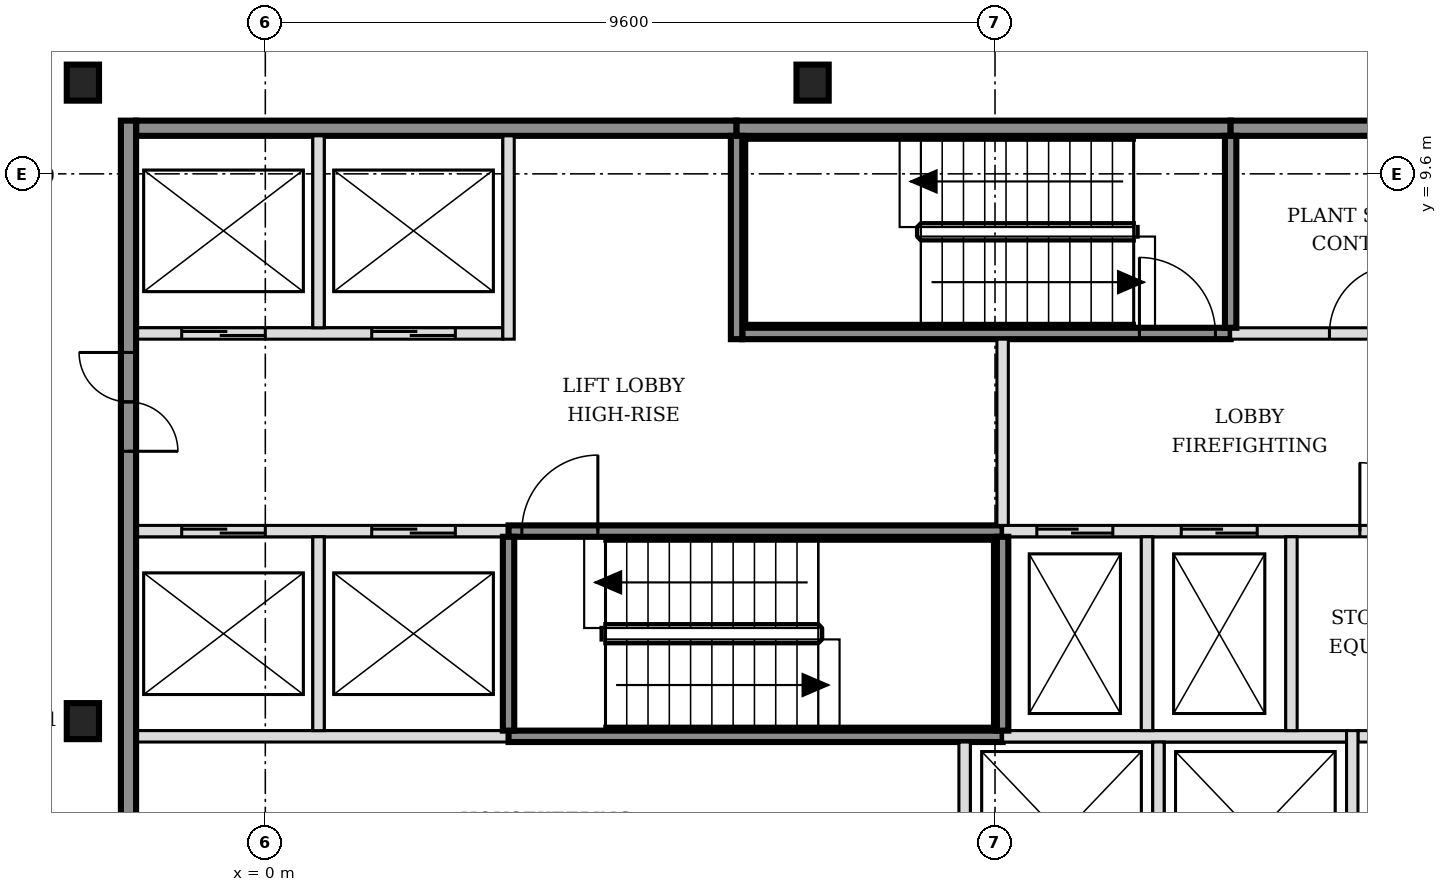
"""IFC4 building model, lengths in metres.
Left out: names, types, materials, properties, quantities, classifications, styles, units other than length and angle.
Written with IfcOpenShell. Run it as: python <this file> out.ifc"""

import sys

from ifc_helpers import new_model, si_unit, direction, frame, frame_2d, origin, origin_2d, place, context, subcontext, project, spatial, rectangle, i_section, extrude, element, fill, save


model = new_model("IFC4")
c1 = context("Model", 3, precision=1e-05, world=origin(), true_north=direction((0.0, 1.0)))
c2 = subcontext(c1, "Body", "Model", "MODEL_VIEW")
j1 = project(units=[si_unit("LENGTHUNIT", "METRE"), si_unit("PLANEANGLEUNIT", "RADIAN")], contexts=[c1])
p1 = place(None, origin())
s1 = spatial("IfcSite", under=j1, at=p1, CompositionType="ELEMENT")
p2 = place(p1, origin())
s2 = spatial("IfcBuilding", under=s1, at=p2, CompositionType="ELEMENT")
p3 = place(p2, frame((0.0, 0.0, 132.6)))
s3 = spatial("IfcBuildingStorey", under=s2, at=p3, CompositionType="ELEMENT", Elevation=132.6)
for number, where, z_axis, x_axis in (
    (1, (-2.4, 2.4, -0.15), (0.0, 0.0, 1.0), (1.0, 0.0, 0.0)),
    (2, (-2.4, 10.8, -0.15), (0.0, 0.0, 1.0), (1.0, 0.0, 0.0)),
    (3, (7.2, 10.8, -0.15), (0.0, 0.0, 1.0), (1.0, 0.0, 0.0)),
):
    element("IfcColumn", number, at=place(p3, frame(where, z_axis=z_axis, x_axis=x_axis)), inside=s3, PredefinedType="COLUMN", context=c2, shape_type="SweptSolid", body=[
        extrude(i_section(OverallWidth=0.424, OverallDepth=0.474, WebThickness=0.048, FlangeThickness=0.077, FilletRadius=0.015, at=origin_2d()), origin(), (0.0, 0.0, 1.0), 3.6),
    ])
p4 = place(p3, frame((-1.7, 2.2, 0.0), z_axis=(0.0, 0.0, 1.0), x_axis=(1.0, 0.0, 0.0)))
e4 = element("IfcWall", 4, at=p4, inside=s3, PredefinedType="SOLIDWALL", context=c2, shape_type="SweptSolid", body=[
    extrude(rectangle(XDim=4.9, YDim=0.15, at=frame_2d((2.45, 0.0))), origin(), (0.0, 0.0, 1.0), 3.45),
])
p5 = place(p3, frame((3.2, 2.2, 0.0), z_axis=(0.0, 0.0, 1.0), x_axis=(1.0, 0.0, 0.0)))
e5 = element("IfcWall", 5, at=p5, inside=s3, PredefinedType="SOLIDWALL", context=c2, shape_type="SweptSolid", body=[
    extrude(rectangle(XDim=6.5, YDim=0.15, at=frame_2d((3.25, 0.0))), origin(), (0.0, 0.0, 1.0), 3.45),
])
p6 = place(p3, frame((9.7, 2.2, 0.0), z_axis=(0.0, 0.0, 1.0), x_axis=(1.0, 0.0, 0.0)))
e6 = element("IfcWall", 6, at=p6, inside=s3, PredefinedType="SOLIDWALL", context=c2, shape_type="SweptSolid", body=[
    extrude(rectangle(XDim=4.525, YDim=0.15, at=frame_2d((2.263, 0.0))), origin(), (0.0, 0.0, 1.0), 3.45),
])
p7 = place(p3, frame((14.375, 2.2, 0.0), z_axis=(0.0, 0.0, 1.0), x_axis=(1.0, 0.0, 0.0)))
e7 = element("IfcWall", 7, at=p7, inside=s3, PredefinedType="PARTITIONING", context=c2, shape_type="SweptSolid", body=[
    extrude(rectangle(XDim=1.725, YDim=0.15, at=frame_2d((0.863, 0.0))), origin(), (0.0, 0.0, 1.0), 3.45),
])
p8 = place(p3, frame((-1.7, 4.9, 0.0), z_axis=(0.0, 0.0, 1.0), x_axis=(1.0, 0.0, 0.0)))
e8 = element("IfcWall", 8, at=p8, inside=s3, PredefinedType="SOLIDWALL", context=c2, shape_type="SweptSolid", body=[
    extrude(rectangle(XDim=4.9, YDim=0.15, at=frame_2d((2.45, 0.0))), origin(), (0.0, 0.0, 1.0), 3.45),
])
p9 = place(p8, frame((0.6, 0.0, 0.0)))
e9 = element("IfcOpeningElement", 9, at=p9, cuts=e8, PredefinedType="OPENING", context=c2, shape_type="SweptSolid", body=[
    extrude(rectangle(XDim=1.1, YDim=2.1, at=frame_2d((0.55, 1.05))), frame((0.0, 0.085, 0.0), z_axis=(0.0, -1.0, 0.0), x_axis=(1.0, 0.0, 0.0)), (0.0, 0.0, 1.0), 0.17),
])
p10 = place(p8, frame((3.1, 0.0, 0.0)))
e10 = element("IfcOpeningElement", 10, at=p10, cuts=e8, PredefinedType="OPENING", context=c2, shape_type="SweptSolid", body=[
    extrude(rectangle(XDim=1.1, YDim=2.1, at=frame_2d((0.55, 1.05))), frame((0.0, 0.085, 0.0), z_axis=(0.0, -1.0, 0.0), x_axis=(1.0, 0.0, 0.0)), (0.0, 0.0, 1.0), 0.17),
])
p11 = place(p3, frame((3.2, 4.9, 0.0), z_axis=(0.0, 0.0, 1.0), x_axis=(1.0, 0.0, 0.0)))
e11 = element("IfcWall", 11, at=p11, inside=s3, PredefinedType="SOLIDWALL", context=c2, shape_type="SweptSolid", body=[
    extrude(rectangle(XDim=6.5, YDim=0.15, at=frame_2d((3.25, 0.0))), origin(), (0.0, 0.0, 1.0), 3.45),
])
p12 = place(p11, frame((0.175, 0.0, 0.0)))
e12 = element("IfcOpeningElement", 12, at=p12, cuts=e11, PredefinedType="OPENING", context=c2, shape_type="SweptSolid", body=[
    extrude(rectangle(XDim=1.0, YDim=2.1, at=frame_2d((0.5, 1.05))), frame((0.0, 0.085, 0.0), z_axis=(0.0, -1.0, 0.0), x_axis=(1.0, 0.0, 0.0)), (0.0, 0.0, 1.0), 0.17),
])
p13 = place(p3, frame((9.7, 4.9, 0.0), z_axis=(0.0, 0.0, 1.0), x_axis=(1.0, 0.0, 0.0)))
e13 = element("IfcWall", 13, at=p13, inside=s3, PredefinedType="SOLIDWALL", context=c2, shape_type="SweptSolid", body=[
    extrude(rectangle(XDim=6.4, YDim=0.15, at=frame_2d((3.2, 0.0))), origin(), (0.0, 0.0, 1.0), 3.45),
])
p14 = place(p13, frame((0.45, 0.0, 0.0)))
e14 = element("IfcOpeningElement", 14, at=p14, cuts=e13, PredefinedType="OPENING", context=c2, shape_type="SweptSolid", body=[
    extrude(rectangle(XDim=1.0, YDim=2.1, at=frame_2d((0.5, 1.05))), frame((0.0, 0.085, 0.0), z_axis=(0.0, -1.0, 0.0), x_axis=(1.0, 0.0, 0.0)), (0.0, 0.0, 1.0), 0.17),
])
p15 = place(p13, frame((2.35, 0.0, 0.0)))
e15 = element("IfcOpeningElement", 15, at=p15, cuts=e13, PredefinedType="OPENING", context=c2, shape_type="SweptSolid", body=[
    extrude(rectangle(XDim=1.0, YDim=2.1, at=frame_2d((0.5, 1.05))), frame((0.0, 0.085, 0.0), z_axis=(0.0, -1.0, 0.0), x_axis=(1.0, 0.0, 0.0)), (0.0, 0.0, 1.0), 0.17),
])
p16 = place(p13, frame((4.7, 0.0, 0.0)))
e16 = element("IfcOpeningElement", 16, at=p16, cuts=e13, PredefinedType="OPENING", context=c2, shape_type="SweptSolid", body=[
    extrude(rectangle(XDim=0.9, YDim=2.1, at=frame_2d((0.45, 1.05))), frame((0.0, 0.085, 0.0), z_axis=(0.0, -1.0, 0.0), x_axis=(1.0, 0.0, 0.0)), (0.0, 0.0, 1.0), 0.17),
])
p17 = place(p3, frame((-1.7, 7.5, 0.0), z_axis=(0.0, 0.0, 1.0), x_axis=(1.0, 0.0, 0.0)))
e17 = element("IfcWall", 17, at=p17, inside=s3, PredefinedType="SOLIDWALL", context=c2, shape_type="SweptSolid", body=[
    extrude(rectangle(XDim=4.825, YDim=0.15, at=frame_2d((2.413, 0.0))), origin(), (0.0, 0.0, 1.0), 3.45),
])
p18 = place(p17, frame((0.6, 0.0, 0.0)))
e18 = element("IfcOpeningElement", 18, at=p18, cuts=e17, PredefinedType="OPENING", context=c2, shape_type="SweptSolid", body=[
    extrude(rectangle(XDim=1.1, YDim=2.1, at=frame_2d((0.55, 1.05))), frame((0.0, 0.085, 0.0), z_axis=(0.0, -1.0, 0.0), x_axis=(1.0, 0.0, 0.0)), (0.0, 0.0, 1.0), 0.17),
])
p19 = place(p17, frame((3.1, 0.0, 0.0)))
e19 = element("IfcOpeningElement", 19, at=p19, cuts=e17, PredefinedType="OPENING", context=c2, shape_type="SweptSolid", body=[
    extrude(rectangle(XDim=1.1, YDim=2.1, at=frame_2d((0.55, 1.05))), frame((0.0, 0.085, 0.0), z_axis=(0.0, -1.0, 0.0), x_axis=(1.0, 0.0, 0.0)), (0.0, 0.0, 1.0), 0.17),
])
p20 = place(p3, frame((6.275, 7.5, 0.0), z_axis=(0.0, 0.0, 1.0), x_axis=(1.0, 0.0, 0.0)))
e20 = element("IfcWall", 20, at=p20, inside=s3, PredefinedType="SOLIDWALL", context=c2, shape_type="SweptSolid", body=[
    extrude(rectangle(XDim=6.425, YDim=0.15, at=frame_2d((3.212, 0.0))), origin(), (0.0, 0.0, 1.0), 3.45),
])
p21 = place(p20, frame((5.225, 0.0, 0.0)))
e21 = element("IfcOpeningElement", 21, at=p21, cuts=e20, PredefinedType="OPENING", context=c2, shape_type="SweptSolid", body=[
    extrude(rectangle(XDim=1.0, YDim=2.1, at=frame_2d((0.5, 1.05))), frame((0.0, 0.085, 0.0), z_axis=(0.0, -1.0, 0.0), x_axis=(1.0, 0.0, 0.0)), (0.0, 0.0, 1.0), 0.17),
])
p22 = place(p3, frame((12.7, 7.5, 0.0), z_axis=(0.0, 0.0, 1.0), x_axis=(1.0, 0.0, 0.0)))
e22 = element("IfcWall", 22, at=p22, inside=s3, PredefinedType="SOLIDWALL", context=c2, shape_type="SweptSolid", body=[
    extrude(rectangle(XDim=3.4, YDim=0.15, at=frame_2d((1.7, 0.0))), origin(), (0.0, 0.0, 1.0), 3.45),
])
p23 = place(p22, frame((1.3, 0.0, 0.0)))
e23 = element("IfcOpeningElement", 23, at=p23, cuts=e22, PredefinedType="OPENING", context=c2, shape_type="SweptSolid", body=[
    extrude(rectangle(XDim=0.9, YDim=2.1, at=frame_2d((0.45, 1.05))), frame((0.0, 0.085, 0.0), z_axis=(0.0, -1.0, 0.0), x_axis=(1.0, 0.0, 0.0)), (0.0, 0.0, 1.0), 0.17),
])
p24 = place(p3, frame((-1.7, 10.2, 0.0), z_axis=(0.0, 0.0, 1.0), x_axis=(1.0, 0.0, 0.0)))
e24 = element("IfcWall", 24, at=p24, inside=s3, PredefinedType="SOLIDWALL", context=c2, shape_type="SweptSolid", body=[
    extrude(rectangle(XDim=7.9, YDim=0.2, at=frame_2d((3.95, 0.0))), origin(), (0.0, 0.0, 1.0), 3.45),
])
p25 = place(p3, frame((6.2, 10.2, 0.0), z_axis=(0.0, 0.0, 1.0), x_axis=(1.0, 0.0, 0.0)))
e25 = element("IfcWall", 25, at=p25, inside=s3, PredefinedType="SOLIDWALL", context=c2, shape_type="SweptSolid", body=[
    extrude(rectangle(XDim=6.5, YDim=0.2, at=frame_2d((3.25, 0.0))), origin(), (0.0, 0.0, 1.0), 3.45),
])
p26 = place(p3, frame((12.7, 10.2, 0.0), z_axis=(0.0, 0.0, 1.0), x_axis=(1.0, 0.0, 0.0)))
e26 = element("IfcWall", 26, at=p26, inside=s3, PredefinedType="SOLIDWALL", context=c2, shape_type="SweptSolid", body=[
    extrude(rectangle(XDim=3.4, YDim=0.2, at=frame_2d((1.7, 0.0))), origin(), (0.0, 0.0, 1.0), 3.45),
])
p27 = place(p3, frame((-1.8, -5.5, 0.0), z_axis=(0.0, 0.0, 1.0), x_axis=(0.0, 1.0, 0.0)))
e27 = element("IfcWall", 27, at=p27, inside=s3, PredefinedType="SOLIDWALL", context=c2, shape_type="SweptSolid", body=[
    extrude(rectangle(XDim=15.8, YDim=0.2, at=frame_2d((7.9, 0.0))), origin(), (0.0, 0.0, 1.0), 3.45),
])
p28 = place(p27, frame((3.05, 0.0, 0.0)))
e28 = element("IfcOpeningElement", 28, at=p28, cuts=e27, PredefinedType="OPENING", context=c2, shape_type="SweptSolid", body=[
    extrude(rectangle(XDim=1.3, YDim=2.1, at=frame_2d((0.65, 1.05))), frame((0.0, 0.11, 0.0), z_axis=(0.0, -1.0, 0.0), x_axis=(1.0, 0.0, 0.0)), (0.0, 0.0, 1.0), 0.22),
])
p29 = place(p27, frame((11.45, 0.0, 0.0)))
e29 = element("IfcOpeningElement", 29, at=p29, cuts=e27, PredefinedType="OPENING", context=c2, shape_type="SweptSolid", body=[
    extrude(rectangle(XDim=1.3, YDim=2.1, at=frame_2d((0.65, 1.05))), frame((0.0, 0.11, 0.0), z_axis=(0.0, -1.0, 0.0), x_axis=(1.0, 0.0, 0.0)), (0.0, 0.0, 1.0), 0.22),
])
p30 = place(p3, frame((0.7, 2.275, 0.0), z_axis=(0.0, 0.0, 1.0), x_axis=(0.0, 1.0, 0.0)))
e30 = element("IfcWall", 30, at=p30, inside=s3, PredefinedType="SOLIDWALL", context=c2, shape_type="SweptSolid", body=[
    extrude(rectangle(XDim=2.55, YDim=0.15, at=frame_2d((1.275, 0.0))), origin(), (0.0, 0.0, 1.0), 3.45),
])
p31 = place(p3, frame((0.7, 7.575, 0.0), z_axis=(0.0, 0.0, 1.0), x_axis=(0.0, 1.0, 0.0)))
e31 = element("IfcWall", 31, at=p31, inside=s3, PredefinedType="SOLIDWALL", context=c2, shape_type="SweptSolid", body=[
    extrude(rectangle(XDim=2.525, YDim=0.15, at=frame_2d((1.263, 0.0))), origin(), (0.0, 0.0, 1.0), 3.45),
])
p32 = place(p3, frame((3.2, 2.275, 0.0), z_axis=(0.0, 0.0, 1.0), x_axis=(0.0, 1.0, 0.0)))
e32 = element("IfcWall", 32, at=p32, inside=s3, PredefinedType="SOLIDWALL", context=c2, shape_type="SweptSolid", body=[
    extrude(rectangle(XDim=2.55, YDim=0.15, at=frame_2d((1.275, 0.0))), origin(), (0.0, 0.0, 1.0), 3.45),
])
for number, where, z_axis, x_axis in (
    (33, (3.2, 7.425, 0.0), (0.0, 0.0, 1.0), (0.0, 1.0, 0.0)),
    (34, (6.2, 7.425, 0.0), (0.0, 0.0, 1.0), (0.0, 1.0, 0.0)),
):
    element("IfcWall", number, at=place(p3, frame(where, z_axis=z_axis, x_axis=x_axis)), inside=s3, PredefinedType="SOLIDWALL", context=c2, shape_type="SweptSolid", body=[
        extrude(rectangle(XDim=2.675, YDim=0.15, at=frame_2d((1.337, 0.0))), origin(), (0.0, 0.0, 1.0), 3.45),
    ])
p33 = place(p3, frame((9.2, -0.475, 0.0), z_axis=(0.0, 0.0, 1.0), x_axis=(0.0, 1.0, 0.0)))
e35 = element("IfcWall", 35, at=p33, inside=s3, PredefinedType="SOLIDWALL", context=c2, shape_type="SweptSolid", body=[
    extrude(rectangle(XDim=2.6, YDim=0.15, at=frame_2d((1.3, 0.0))), origin(), (0.0, 0.0, 1.0), 3.45),
])
p34 = place(p3, frame((9.7, 2.275, 0.0), z_axis=(0.0, 0.0, 1.0), x_axis=(0.0, 1.0, 0.0)))
e36 = element("IfcWall", 36, at=p34, inside=s3, PredefinedType="SOLIDWALL", context=c2, shape_type="SweptSolid", body=[
    extrude(rectangle(XDim=2.55, YDim=0.15, at=frame_2d((1.275, 0.0))), origin(), (0.0, 0.0, 1.0), 3.45),
])
p35 = place(p3, frame((9.7, 4.975, 0.0), z_axis=(0.0, 0.0, 1.0), x_axis=(0.0, 1.0, 0.0)))
e37 = element("IfcWall", 37, at=p35, inside=s3, PredefinedType="SOLIDWALL", context=c2, shape_type="SweptSolid", body=[
    extrude(rectangle(XDim=2.45, YDim=0.15, at=frame_2d((1.225, 0.0))), origin(), (0.0, 0.0, 1.0), 3.45),
])
p36 = place(p3, frame((11.6, 2.275, 0.0), z_axis=(0.0, 0.0, 1.0), x_axis=(0.0, 1.0, 0.0)))
e38 = element("IfcWall", 38, at=p36, inside=s3, PredefinedType="SOLIDWALL", context=c2, shape_type="SweptSolid", body=[
    extrude(rectangle(XDim=2.55, YDim=0.15, at=frame_2d((1.275, 0.0))), origin(), (0.0, 0.0, 1.0), 3.45),
])
p37 = place(p3, frame((11.75, -0.325, 0.0), z_axis=(0.0, 0.0, 1.0), x_axis=(0.0, 1.0, 0.0)))
e39 = element("IfcWall", 39, at=p37, inside=s3, PredefinedType="SOLIDWALL", context=c2, shape_type="SweptSolid", body=[
    extrude(rectangle(XDim=2.45, YDim=0.15, at=frame_2d((1.225, 0.0))), origin(), (0.0, 0.0, 1.0), 3.45),
])
p38 = place(p3, frame((12.7, 7.575, 0.0), z_axis=(0.0, 0.0, 1.0), x_axis=(0.0, 1.0, 0.0)))
e40 = element("IfcWall", 40, at=p38, inside=s3, PredefinedType="SOLIDWALL", context=c2, shape_type="SweptSolid", body=[
    extrude(rectangle(XDim=2.525, YDim=0.15, at=frame_2d((1.263, 0.0))), origin(), (0.0, 0.0, 1.0), 3.45),
])
p39 = place(p3, frame((13.5, 2.275, 0.0), z_axis=(0.0, 0.0, 1.0), x_axis=(0.0, 1.0, 0.0)))
e41 = element("IfcWall", 41, at=p39, inside=s3, PredefinedType="SOLIDWALL", context=c2, shape_type="SweptSolid", body=[
    extrude(rectangle(XDim=2.55, YDim=0.15, at=frame_2d((1.275, 0.0))), origin(), (0.0, 0.0, 1.0), 3.45),
])
p40 = place(p3, frame((14.3, -0.475, 0.0), z_axis=(0.0, 0.0, 1.0), x_axis=(0.0, 1.0, 0.0)))
e42 = element("IfcWall", 42, at=p40, inside=s3, PredefinedType="SOLIDWALL", context=c2, shape_type="SweptSolid", body=[
    extrude(rectangle(XDim=2.75, YDim=0.15, at=frame_2d((1.375, 0.0))), origin(), (0.0, 0.0, 1.0), 3.45),
])
p41 = place(p3, frame((31.072, 4.722, 0.0), z_axis=(0.0, 0.0, 1.0), x_axis=(-0.707106781187, 0.707106781187, 0.0)))
e43 = element("IfcWall", 43, at=p41, inside=s3, PredefinedType="PARTITIONING", context=c2, shape_type="SweptSolid", body=[
    extrude(rectangle(XDim=23.688, YDim=0.15, at=frame_2d((11.844, 0.0))), origin(), (0.0, 0.0, 1.0), 2.73),
])
p42 = place(p41, frame((8.135, 0.0, 0.0)))
e44 = element("IfcOpeningElement", 44, at=p42, cuts=e43, PredefinedType="OPENING", context=c2, shape_type="SweptSolid", body=[
    extrude(rectangle(XDim=0.9, YDim=2.1, at=frame_2d((0.45, 1.05))), frame((0.0, 0.085, 0.0), z_axis=(0.0, -1.0, 0.0), x_axis=(1.0, 0.0, 0.0)), (0.0, 0.0, 1.0), 0.17),
])
p43 = place(p41, frame((13.091, 0.0, 0.0)))
e45 = element("IfcOpeningElement", 45, at=p43, cuts=e43, PredefinedType="OPENING", context=c2, shape_type="SweptSolid", body=[
    extrude(rectangle(XDim=0.9, YDim=2.1, at=frame_2d((0.45, 1.05))), frame((0.0, 0.085, 0.0), z_axis=(0.0, -1.0, 0.0), x_axis=(1.0, 0.0, 0.0)), (0.0, 0.0, 1.0), 0.17),
])
p44 = place(p41, frame((18.69, 0.0, 0.0)))
e46 = element("IfcOpeningElement", 46, at=p44, cuts=e43, PredefinedType="OPENING", context=c2, shape_type="SweptSolid", body=[
    extrude(rectangle(XDim=0.9, YDim=2.1, at=frame_2d((0.45, 1.05))), frame((0.0, 0.085, 0.0), z_axis=(0.0, -1.0, 0.0), x_axis=(1.0, 0.0, 0.0)), (0.0, 0.0, 1.0), 0.17),
])
p45 = place(p3, frame((-14.475, 6.919, 0.0), z_axis=(0.0, 0.0, 1.0), x_axis=(0.707106781187, 0.707106781187, 0.0)))
e47 = element("IfcWall", 47, at=p45, inside=s3, PredefinedType="PARTITIONING", context=c2, shape_type="SweptSolid", body=[
    extrude(rectangle(XDim=20.581, YDim=0.15, at=frame_2d((10.291, 0.0))), origin(), (0.0, 0.0, 1.0), 2.73),
])
p46 = place(p45, frame((17.983, 0.0, 0.0)))
e48 = element("IfcOpeningElement", 48, at=p46, cuts=e47, PredefinedType="OPENING", context=c2, shape_type="SweptSolid", body=[
    extrude(rectangle(XDim=0.9, YDim=2.1, at=frame_2d((0.45, 1.05))), frame((0.0, 0.085, 0.0), z_axis=(0.0, -1.0, 0.0), x_axis=(1.0, 0.0, 0.0)), (0.0, 0.0, 1.0), 0.17),
])
p47 = place(p45, frame((10.77, 0.0, 0.0)))
e49 = element("IfcOpeningElement", 49, at=p47, cuts=e47, PredefinedType="OPENING", context=c2, shape_type="SweptSolid", body=[
    extrude(rectangle(XDim=0.9, YDim=2.1, at=frame_2d((0.45, 1.05))), frame((0.0, 0.085, 0.0), z_axis=(0.0, -1.0, 0.0), x_axis=(1.0, 0.0, 0.0)), (0.0, 0.0, 1.0), 0.17),
])
p48 = place(p45, frame((7.014, 0.0, 0.0)))
e50 = element("IfcOpeningElement", 50, at=p48, cuts=e47, PredefinedType="OPENING", context=c2, shape_type="SweptSolid", body=[
    extrude(rectangle(XDim=0.9, YDim=2.1, at=frame_2d((0.45, 1.05))), frame((0.0, 0.085, 0.0), z_axis=(0.0, -1.0, 0.0), x_axis=(1.0, 0.0, 0.0)), (0.0, 0.0, 1.0), 0.17),
])
p49 = place(p45, frame((1.499, 0.0, 0.0)))
e51 = element("IfcOpeningElement", 51, at=p49, cuts=e47, PredefinedType="OPENING", context=c2, shape_type="SweptSolid", body=[
    extrude(rectangle(XDim=0.9, YDim=2.1, at=frame_2d((0.45, 1.05))), frame((0.0, 0.085, 0.0), z_axis=(0.0, -1.0, 0.0), x_axis=(1.0, 0.0, 0.0)), (0.0, 0.0, 1.0), 0.17),
])
p50 = place(p9, origin())
e52 = element("IfcDoor", 52, at=p50, inside=s3, OperationType="DOUBLE_DOOR_SLIDING", PredefinedType="DOOR", context=c2, shape_type="SweptSolid", body=[
    extrude(rectangle(XDim=1.1, YDim=2.1, at=frame_2d((0.55, 1.05))), frame((0.0, 0.025, 0.0), z_axis=(0.0, -1.0, 0.0), x_axis=(1.0, 0.0, 0.0)), (0.0, 0.0, 1.0), 0.05),
])
fill(e9, e52)
p51 = place(p10, origin())
e53 = element("IfcDoor", 53, at=p51, inside=s3, OperationType="DOUBLE_DOOR_SLIDING", PredefinedType="DOOR", context=c2, shape_type="SweptSolid", body=[
    extrude(rectangle(XDim=1.1, YDim=2.1, at=frame_2d((0.55, 1.05))), frame((0.0, 0.025, 0.0), z_axis=(0.0, -1.0, 0.0), x_axis=(1.0, 0.0, 0.0)), (0.0, 0.0, 1.0), 0.05),
])
fill(e10, e53)
p52 = place(p18, origin())
e54 = element("IfcDoor", 54, at=p52, inside=s3, OperationType="DOUBLE_DOOR_SLIDING", PredefinedType="DOOR", context=c2, shape_type="SweptSolid", body=[
    extrude(rectangle(XDim=1.1, YDim=2.1, at=frame_2d((0.55, 1.05))), frame((0.0, 0.025, 0.0), z_axis=(0.0, -1.0, 0.0), x_axis=(1.0, 0.0, 0.0)), (0.0, 0.0, 1.0), 0.05),
])
fill(e18, e54)
p53 = place(p19, origin())
e55 = element("IfcDoor", 55, at=p53, inside=s3, OperationType="DOUBLE_DOOR_SLIDING", PredefinedType="DOOR", context=c2, shape_type="SweptSolid", body=[
    extrude(rectangle(XDim=1.1, YDim=2.1, at=frame_2d((0.55, 1.05))), frame((0.0, 0.025, 0.0), z_axis=(0.0, -1.0, 0.0), x_axis=(1.0, 0.0, 0.0)), (0.0, 0.0, 1.0), 0.05),
])
fill(e19, e55)
p54 = place(p14, origin())
e56 = element("IfcDoor", 56, at=p54, inside=s3, OperationType="DOUBLE_DOOR_SLIDING", PredefinedType="DOOR", context=c2, shape_type="SweptSolid", body=[
    extrude(rectangle(XDim=1.0, YDim=2.1, at=frame_2d((0.5, 1.05))), frame((0.0, 0.025, 0.0), z_axis=(0.0, -1.0, 0.0), x_axis=(1.0, 0.0, 0.0)), (0.0, 0.0, 1.0), 0.05),
])
fill(e14, e56)
p55 = place(p15, origin())
e57 = element("IfcDoor", 57, at=p55, inside=s3, OperationType="DOUBLE_DOOR_SLIDING", PredefinedType="DOOR", context=c2, shape_type="SweptSolid", body=[
    extrude(rectangle(XDim=1.0, YDim=2.1, at=frame_2d((0.5, 1.05))), frame((0.0, 0.025, 0.0), z_axis=(0.0, -1.0, 0.0), x_axis=(1.0, 0.0, 0.0)), (0.0, 0.0, 1.0), 0.05),
])
fill(e15, e57)
p56 = place(p12, origin())
e58 = element("IfcDoor", 58, at=p56, inside=s3, OperationType="SINGLE_SWING_RIGHT", PredefinedType="DOOR", context=c2, shape_type="SweptSolid", body=[
    extrude(rectangle(XDim=1.0, YDim=2.1, at=frame_2d((0.5, 1.05))), frame((0.0, 0.025, 0.0), z_axis=(0.0, -1.0, 0.0), x_axis=(1.0, 0.0, 0.0)), (0.0, 0.0, 1.0), 0.05),
])
fill(e12, e58)
p57 = place(p21, origin())
e59 = element("IfcDoor", 59, at=p57, inside=s3, OperationType="SINGLE_SWING_LEFT", PredefinedType="DOOR", context=c2, shape_type="SweptSolid", body=[
    extrude(rectangle(XDim=1.0, YDim=2.1, at=frame_2d((0.5, 1.05))), frame((0.0, 0.025, 0.0), z_axis=(0.0, -1.0, 0.0), x_axis=(1.0, 0.0, 0.0)), (0.0, 0.0, 1.0), 0.05),
])
fill(e21, e59)
p58 = place(p29, origin())
e60 = element("IfcDoor", 60, at=p58, inside=s3, OperationType="DOUBLE_DOOR_SINGLE_SWING", PredefinedType="DOOR", context=c2, shape_type="SweptSolid", body=[
    extrude(rectangle(XDim=1.3, YDim=2.1, at=frame_2d((0.65, 1.05))), frame((0.0, 0.025, 0.0), z_axis=(0.0, -1.0, 0.0), x_axis=(1.0, 0.0, 0.0)), (0.0, 0.0, 1.0), 0.05),
])
fill(e29, e60)
p59 = place(p16, origin())
e61 = element("IfcDoor", 61, at=p59, inside=s3, OperationType="SINGLE_SWING_LEFT", PredefinedType="DOOR", context=c2, shape_type="SweptSolid", body=[
    extrude(rectangle(XDim=0.9, YDim=2.1, at=frame_2d((0.45, 1.05))), frame((0.0, 0.025, 0.0), z_axis=(0.0, -1.0, 0.0), x_axis=(1.0, 0.0, 0.0)), (0.0, 0.0, 1.0), 0.05),
])
fill(e16, e61)
p60 = place(p23, origin())
e62 = element("IfcDoor", 62, at=p60, inside=s3, OperationType="SINGLE_SWING_RIGHT", PredefinedType="DOOR", context=c2, shape_type="SweptSolid", body=[
    extrude(rectangle(XDim=0.9, YDim=2.1, at=frame_2d((0.45, 1.05))), frame((0.0, 0.025, 0.0), z_axis=(0.0, -1.0, 0.0), x_axis=(1.0, 0.0, 0.0)), (0.0, 0.0, 1.0), 0.05),
])
fill(e23, e62)
save(model, sys.argv[1])
